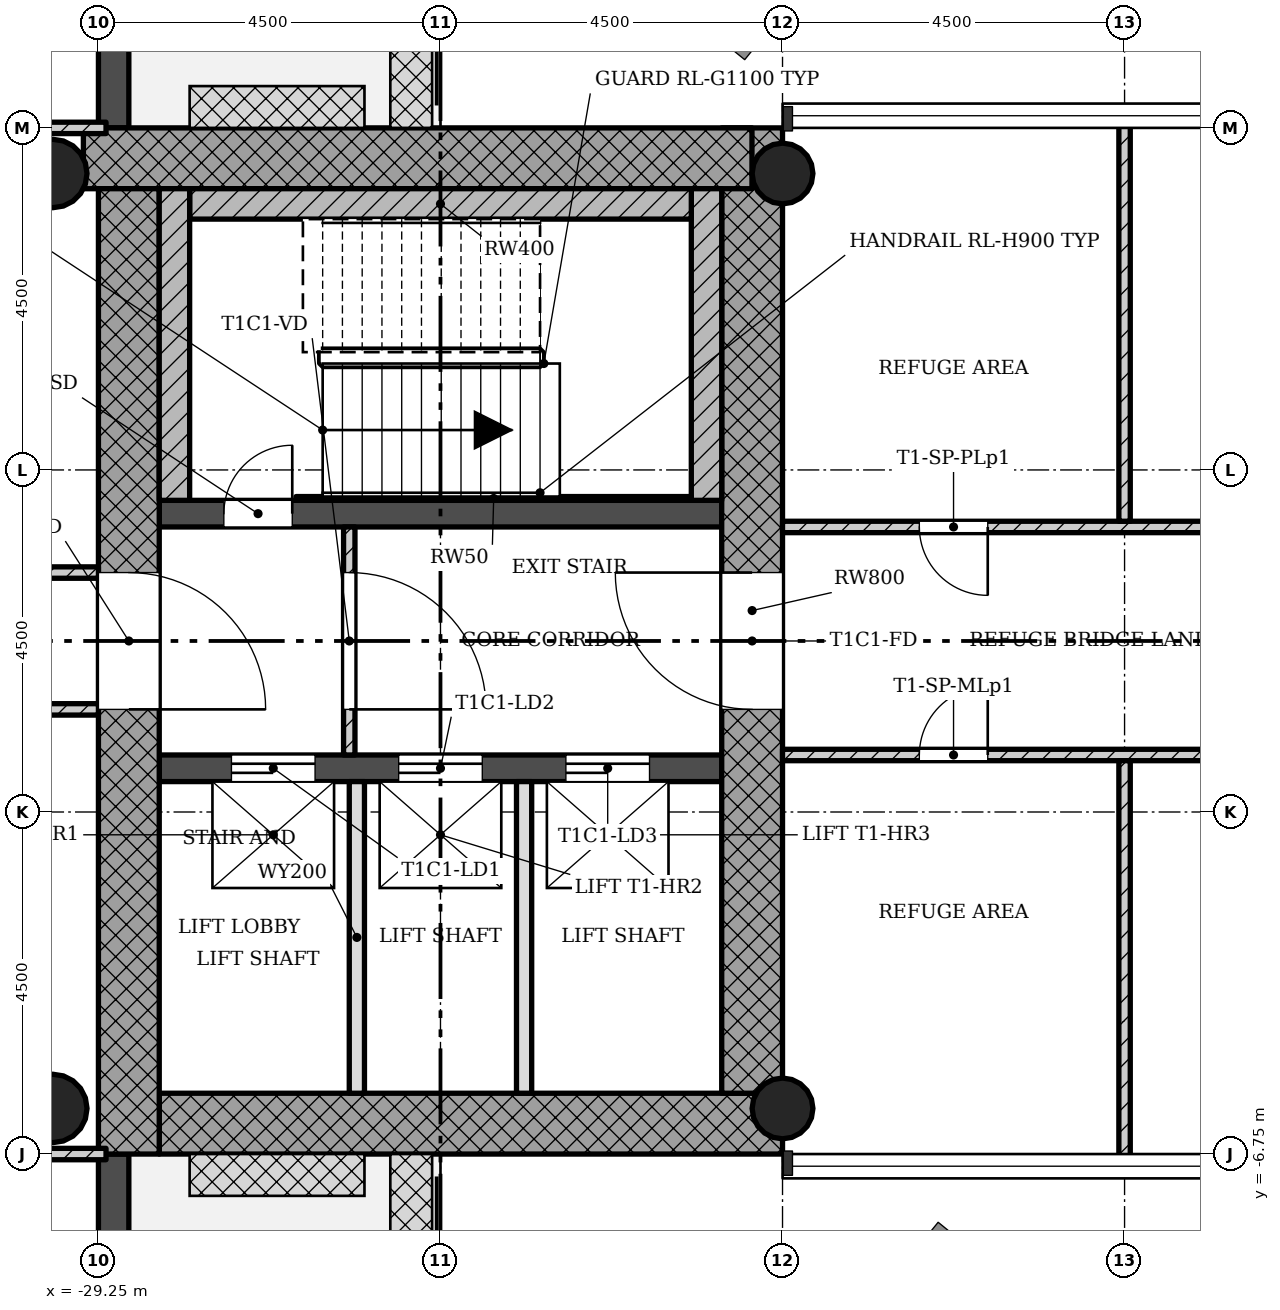
"""IFC4 building model, lengths in metres.
Left out: names, types, materials, properties, quantities, classifications, styles, units other than length and angle.
Written with IfcOpenShell. Run it as: python <this file> out.ifc"""

import sys

from ifc_helpers import new_model, si_unit, direction, frame, frame_2d, origin, origin_2d, place, context, subcontext, project, spatial, rectangle, hollow_circle, extrude, element, fill, save


model = new_model("IFC4")
c1 = context("Model", 3, precision=1e-05, world=origin(), true_north=direction((0.0, 1.0)))
c2 = subcontext(c1, "Body", "Model", "MODEL_VIEW")
j1 = project(units=[si_unit("LENGTHUNIT", "METRE"), si_unit("PLANEANGLEUNIT", "RADIAN")], contexts=[c1])
p1 = place(None, origin())
s1 = spatial("IfcSite", under=j1, at=p1, CompositionType="ELEMENT")
p2 = place(p1, origin())
s2 = spatial("IfcBuilding", under=s1, at=p2, CompositionType="ELEMENT")
p3 = place(p2, frame((0.0, 0.0, 181.3)))
s3 = spatial("IfcBuildingStorey", under=s2, at=p3, CompositionType="ELEMENT", Elevation=181.3)
p4 = place(p3, frame((-28.45, -6.35, 0.0), z_axis=(0.0, 0.0, 1.0), x_axis=(1.0, 0.0, 0.0)))
e1 = element("IfcWall", 1, at=p4, inside=s3, PredefinedType="SHEAR", context=c2, shape_type="SweptSolid", body=[
    extrude(rectangle(XDim=8.2, YDim=0.8, at=frame_2d((4.1, 0.0))), origin(), (0.0, 0.0, 1.0), 4.5),
])
p5 = place(p3, frame((-20.65, -5.95, 0.0), z_axis=(0.0, 0.0, 1.0), x_axis=(0.0, 1.0, 0.0)))
e2 = element("IfcWall", 2, at=p5, inside=s3, PredefinedType="SHEAR", context=c2, shape_type="SweptSolid", body=[
    extrude(rectangle(XDim=12.7, YDim=0.8, at=frame_2d((6.35, 0.0))), origin(), (0.0, 0.0, 1.0), 4.5),
])
p6 = place(p5, frame((5.05, 0.0, 0.0)))
e3 = element("IfcOpeningElement", 3, at=p6, cuts=e2, PredefinedType="OPENING", context=c2, shape_type="SweptSolid", body=[
    extrude(rectangle(XDim=1.8, YDim=2.1, at=frame_2d((0.9, 1.05))), frame((0.0, 0.41, 0.0), z_axis=(0.0, -1.0, 0.0), x_axis=(1.0, 0.0, 0.0)), (0.0, 0.0, 1.0), 0.82),
])
p7 = place(p3, frame((-20.652, 6.35, 0.0), z_axis=(0.0, 0.0, 1.0), x_axis=(-1.0, 0.0, 0.0)))
e4 = element("IfcWall", 4, at=p7, inside=s3, PredefinedType="SHEAR", context=c2, shape_type="SweptSolid", body=[
    extrude(rectangle(XDim=8.796, YDim=0.8, at=frame_2d((4.398, 0.0))), origin(), (0.0, 0.0, 1.0), 4.5),
])
p8 = place(p3, frame((-28.85, 5.95, 0.0), z_axis=(0.0, 0.0, 1.0), x_axis=(0.0, -1.0, 0.0)))
e5 = element("IfcWall", 5, at=p8, inside=s3, PredefinedType="SHEAR", context=c2, shape_type="SweptSolid", body=[
    extrude(rectangle(XDim=12.7, YDim=0.8, at=frame_2d((6.35, 0.0))), origin(), (0.0, 0.0, 1.0), 4.5),
])
p9 = place(p8, frame((5.05, 0.0, 0.0)))
e6 = element("IfcOpeningElement", 6, at=p9, cuts=e5, PredefinedType="OPENING", context=c2, shape_type="SweptSolid", body=[
    extrude(rectangle(XDim=1.8, YDim=2.1, at=frame_2d((0.9, 1.05))), frame((0.0, 0.41, 0.0), z_axis=(0.0, -1.0, 0.0), x_axis=(1.0, 0.0, 0.0)), (0.0, 0.0, 1.0), 0.82),
])
p10 = place(p3, frame((-28.45, -1.675, 0.0), z_axis=(0.0, 0.0, 1.0), x_axis=(1.0, 0.0, 0.0)))
e7 = element("IfcWall", 7, at=p10, inside=s3, PredefinedType="SHEAR", context=c2, shape_type="SweptSolid", body=[
    extrude(rectangle(XDim=7.4, YDim=0.35, at=frame_2d((3.7, 0.0))), origin(), (0.0, 0.0, 1.0), 4.5),
])
p11 = place(p10, frame((0.95, 0.0, 0.0)))
e8 = element("IfcOpeningElement", 8, at=p11, cuts=e7, PredefinedType="OPENING", context=c2, shape_type="SweptSolid", body=[
    extrude(rectangle(XDim=1.1, YDim=2.1, at=frame_2d((0.55, 1.05))), frame((0.0, 0.185, 0.0), z_axis=(0.0, -1.0, 0.0), x_axis=(1.0, 0.0, 0.0)), (0.0, 0.0, 1.0), 0.37),
])
p12 = place(p10, frame((3.15, 0.0, 0.0)))
e9 = element("IfcOpeningElement", 9, at=p12, cuts=e7, PredefinedType="OPENING", context=c2, shape_type="SweptSolid", body=[
    extrude(rectangle(XDim=1.1, YDim=2.1, at=frame_2d((0.55, 1.05))), frame((0.0, 0.185, 0.0), z_axis=(0.0, -1.0, 0.0), x_axis=(1.0, 0.0, 0.0)), (0.0, 0.0, 1.0), 0.37),
])
p13 = place(p10, frame((5.35, 0.0, 0.0)))
e10 = element("IfcOpeningElement", 10, at=p13, cuts=e7, PredefinedType="OPENING", context=c2, shape_type="SweptSolid", body=[
    extrude(rectangle(XDim=1.1, YDim=2.1, at=frame_2d((0.55, 1.05))), frame((0.0, 0.185, 0.0), z_axis=(0.0, -1.0, 0.0), x_axis=(1.0, 0.0, 0.0)), (0.0, 0.0, 1.0), 0.37),
])
p14 = place(p3, frame((-28.45, 1.675, 0.0), z_axis=(0.0, 0.0, 1.0), x_axis=(1.0, 0.0, 0.0)))
e11 = element("IfcWall", 11, at=p14, inside=s3, PredefinedType="SHEAR", context=c2, shape_type="SweptSolid", body=[
    extrude(rectangle(XDim=7.4, YDim=0.35, at=frame_2d((3.7, 0.0))), origin(), (0.0, 0.0, 1.0), 4.5),
])
p15 = place(p14, frame((0.85, 0.0, 0.0)))
e12 = element("IfcOpeningElement", 12, at=p15, cuts=e11, PredefinedType="OPENING", context=c2, shape_type="SweptSolid", body=[
    extrude(rectangle(XDim=0.9, YDim=2.1, at=frame_2d((0.45, 1.05))), frame((0.0, 0.185, 0.0), z_axis=(0.0, -1.0, 0.0), x_axis=(1.0, 0.0, 0.0)), (0.0, 0.0, 1.0), 0.37),
])
for number, where, z_axis, x_axis in (
    (13, (-20.25, -6.15, 0.0), (0.0, 0.0, 1.0), (1.0, 0.0, 0.0)),
    (14, (-20.25, 6.15, 0.0), (0.0, 0.0, 1.0), (1.0, 0.0, 0.0)),
):
    element("IfcColumn", number, at=place(p3, frame(where, z_axis=z_axis, x_axis=x_axis)), inside=s3, PredefinedType="COLUMN", context=c2, shape_type="SweptSolid", body=[
        extrude(hollow_circle(Radius=0.4, WallThickness=0.028, at=origin_2d()), origin(), (0.0, 0.0, 1.0), 4.5),
    ])
for number, where, z_axis, x_axis in (
    (15, (-29.85, -6.15, 0.0), (0.0, 0.0, 1.0), (1.0, 0.0, 0.0)),
    (16, (-29.85, 6.15, 0.0), (0.0, 0.0, 1.0), (1.0, 0.0, 0.0)),
):
    element("IfcColumn", number, at=place(p3, frame(where, z_axis=z_axis, x_axis=x_axis)), inside=s3, PredefinedType="COLUMN", context=c2, shape_type="SweptSolid", body=[
        extrude(hollow_circle(Radius=0.45, WallThickness=0.032, at=origin_2d()), origin(), (0.0, 0.0, 1.0), 4.5),
    ])
p16 = place(p3, frame((-29.05, -11.25, -0.02), z_axis=(0.0, 0.0, 1.0), x_axis=(0.0, 1.0, 0.0)))
e17 = element("IfcWall", 17, at=p16, inside=s3, PredefinedType="STANDARD", context=c2, shape_type="SweptSolid", body=[
    extrude(rectangle(XDim=4.5, YDim=0.4, at=frame_2d((2.25, 0.0))), origin(), (0.0, 0.0, 1.0), 4.22),
])
p17 = place(p16, frame((1.35, 0.0, 0.02)))
e18 = element("IfcOpeningElement", 18, at=p17, cuts=e17, PredefinedType="OPENING", context=c2, shape_type="SweptSolid", body=[
    extrude(rectangle(XDim=1.8, YDim=2.1, at=frame_2d((0.9, 1.05))), frame((0.0, 0.21, 0.0), z_axis=(0.0, -1.0, 0.0), x_axis=(1.0, 0.0, 0.0)), (0.0, 0.0, 1.0), 0.42),
])
p18 = place(p3, frame((-29.05, 6.75, -0.02), z_axis=(0.0, 0.0, 1.0), x_axis=(0.0, 1.0, 0.0)))
e19 = element("IfcWall", 19, at=p18, inside=s3, PredefinedType="STANDARD", context=c2, shape_type="SweptSolid", body=[
    extrude(rectangle(XDim=4.5, YDim=0.4, at=frame_2d((2.25, 0.0))), origin(), (0.0, 0.0, 1.0), 4.22),
])
p19 = place(p18, frame((1.35, 0.0, 0.02)))
e20 = element("IfcOpeningElement", 20, at=p19, cuts=e19, PredefinedType="OPENING", context=c2, shape_type="SweptSolid", body=[
    extrude(rectangle(XDim=1.8, YDim=2.1, at=frame_2d((0.9, 1.05))), frame((0.0, 0.21, 0.0), z_axis=(0.0, -1.0, 0.0), x_axis=(1.0, 0.0, 0.0)), (0.0, 0.0, 1.0), 0.42),
])
p20 = place(p3, frame((-25.95, -1.5, 0.0), z_axis=(0.0, 0.0, 1.0), x_axis=(0.0, 1.0, 0.0)))
e21 = element("IfcWall", 21, at=p20, inside=s3, PredefinedType="PARTITIONING", context=c2, shape_type="SweptSolid", body=[
    extrude(rectangle(XDim=3.0, YDim=0.15, at=frame_2d((1.5, 0.0))), origin(), (0.0, 0.0, 1.0), 4.08),
])
p21 = place(p20, frame((0.6, 0.0, 0.0)))
e22 = element("IfcOpeningElement", 22, at=p21, cuts=e21, PredefinedType="OPENING", context=c2, shape_type="SweptSolid", body=[
    extrude(rectangle(XDim=1.8, YDim=2.1, at=frame_2d((0.9, 1.05))), frame((0.0, 0.085, 0.0), z_axis=(0.0, -1.0, 0.0), x_axis=(1.0, 0.0, 0.0)), (0.0, 0.0, 1.0), 0.17),
])
for number, where, z_axis, x_axis in (
    (23, (-25.85, -5.95, 0.0), (0.0, 0.0, 1.0), (0.0, 1.0, 0.0)),
    (24, (-23.65, -5.95, 0.0), (0.0, 0.0, 1.0), (0.0, 1.0, 0.0)),
):
    element("IfcWall", number, at=place(p3, frame(where, z_axis=z_axis, x_axis=x_axis)), inside=s3, PredefinedType="SOLIDWALL", context=c2, shape_type="SweptSolid", body=[
        extrude(rectangle(XDim=4.1, YDim=0.2, at=frame_2d((2.05, 0.0))), origin(), (0.0, 0.0, 1.0), 4.08),
    ])
p22 = place(p3, frame((-35.1, 0.9, 0.0), z_axis=(0.0, 0.0, 1.0), x_axis=(1.0, 0.0, 0.0)))
e25 = element("IfcWall", 25, at=p22, inside=s3, PredefinedType="PARTITIONING", context=c2, shape_type="SweptSolid", body=[
    extrude(rectangle(XDim=5.85, YDim=0.15, at=frame_2d((2.925, 0.0))), origin(), (0.0, 0.0, 1.0), 4.08),
])
p23 = place(p22, frame((2.475, 0.0, 0.0)))
e26 = element("IfcOpeningElement", 26, at=p23, cuts=e25, PredefinedType="OPENING", context=c2, shape_type="SweptSolid", body=[
    extrude(rectangle(XDim=0.9, YDim=2.1, at=frame_2d((0.45, 1.05))), frame((0.0, 0.085, 0.0), z_axis=(0.0, -1.0, 0.0), x_axis=(1.0, 0.0, 0.0)), (0.0, 0.0, 1.0), 0.17),
])
p24 = place(p3, frame((-35.1, -0.9, 0.0), z_axis=(0.0, 0.0, 1.0), x_axis=(1.0, 0.0, 0.0)))
e27 = element("IfcWall", 27, at=p24, inside=s3, PredefinedType="PARTITIONING", context=c2, shape_type="SweptSolid", body=[
    extrude(rectangle(XDim=5.85, YDim=0.15, at=frame_2d((2.925, 0.0))), origin(), (0.0, 0.0, 1.0), 4.08),
])
p25 = place(p24, frame((2.475, 0.0, 0.0)))
e28 = element("IfcOpeningElement", 28, at=p25, cuts=e27, PredefinedType="OPENING", context=c2, shape_type="SweptSolid", body=[
    extrude(rectangle(XDim=0.9, YDim=2.1, at=frame_2d((0.45, 1.05))), frame((0.0, 0.085, 0.0), z_axis=(0.0, -1.0, 0.0), x_axis=(1.0, 0.0, 0.0)), (0.0, 0.0, 1.0), 0.17),
])
p26 = place(p3, frame((-20.25, 1.5, 0.0), z_axis=(0.0, 0.0, 1.0), x_axis=(1.0, 0.0, 0.0)))
e29 = element("IfcWall", 29, at=p26, inside=s3, PredefinedType="PARTITIONING", context=c2, shape_type="SweptSolid", body=[
    extrude(rectangle(XDim=9.1, YDim=0.15, at=frame_2d((4.55, 0.0))), origin(), (0.0, 0.0, 1.0), 4.08),
])
p27 = place(p26, frame((1.8, 0.0, 0.0)))
e30 = element("IfcOpeningElement", 30, at=p27, cuts=e29, PredefinedType="OPENING", context=c2, shape_type="SweptSolid", body=[
    extrude(rectangle(XDim=0.9, YDim=2.1, at=frame_2d((0.45, 1.05))), frame((0.0, 0.085, 0.0), z_axis=(0.0, -1.0, 0.0), x_axis=(1.0, 0.0, 0.0)), (0.0, 0.0, 1.0), 0.17),
])
p28 = place(p26, frame((6.3, 0.0, 0.0)))
e31 = element("IfcOpeningElement", 31, at=p28, cuts=e29, PredefinedType="OPENING", context=c2, shape_type="SweptSolid", body=[
    extrude(rectangle(XDim=0.9, YDim=2.1, at=frame_2d((0.45, 1.05))), frame((0.0, 0.085, 0.0), z_axis=(0.0, -1.0, 0.0), x_axis=(1.0, 0.0, 0.0)), (0.0, 0.0, 1.0), 0.17),
])
p29 = place(p3, frame((-15.75, 1.575, 0.0), z_axis=(0.0, 0.0, 1.0), x_axis=(0.0, 1.0, 0.0)))
e32 = element("IfcWall", 32, at=p29, inside=s3, PredefinedType="PARTITIONING", context=c2, shape_type="SweptSolid", body=[
    extrude(rectangle(XDim=5.275, YDim=0.15, at=frame_2d((2.638, 0.0))), origin(), (0.0, 0.0, 1.0), 4.08),
])
p30 = place(p3, frame((-20.25, -1.5, 0.0), z_axis=(0.0, 0.0, 1.0), x_axis=(1.0, 0.0, 0.0)))
e33 = element("IfcWall", 33, at=p30, inside=s3, PredefinedType="PARTITIONING", context=c2, shape_type="SweptSolid", body=[
    extrude(rectangle(XDim=9.1, YDim=0.15, at=frame_2d((4.55, 0.0))), origin(), (0.0, 0.0, 1.0), 4.08),
])
p31 = place(p30, frame((1.8, 0.0, 0.0)))
e34 = element("IfcOpeningElement", 34, at=p31, cuts=e33, PredefinedType="OPENING", context=c2, shape_type="SweptSolid", body=[
    extrude(rectangle(XDim=0.9, YDim=2.1, at=frame_2d((0.45, 1.05))), frame((0.0, 0.085, 0.0), z_axis=(0.0, -1.0, 0.0), x_axis=(1.0, 0.0, 0.0)), (0.0, 0.0, 1.0), 0.17),
])
p32 = place(p30, frame((6.3, 0.0, 0.0)))
e35 = element("IfcOpeningElement", 35, at=p32, cuts=e33, PredefinedType="OPENING", context=c2, shape_type="SweptSolid", body=[
    extrude(rectangle(XDim=0.9, YDim=2.1, at=frame_2d((0.45, 1.05))), frame((0.0, 0.085, 0.0), z_axis=(0.0, -1.0, 0.0), x_axis=(1.0, 0.0, 0.0)), (0.0, 0.0, 1.0), 0.17),
])
p33 = place(p3, frame((-15.75, -1.575, 0.0), z_axis=(0.0, 0.0, 1.0), x_axis=(0.0, -1.0, 0.0)))
e36 = element("IfcWall", 36, at=p33, inside=s3, PredefinedType="PARTITIONING", context=c2, shape_type="SweptSolid", body=[
    extrude(rectangle(XDim=5.275, YDim=0.15, at=frame_2d((2.638, 0.0))), origin(), (0.0, 0.0, 1.0), 4.08),
])
p34 = place(p3, frame((-42.85, 6.75, 0.0), z_axis=(0.0, 0.0, 1.0), x_axis=(1.0, 0.0, 0.0)))
e37 = element("IfcWall", 37, at=p34, inside=s3, PredefinedType="PARTITIONING", context=c2, shape_type="SweptSolid", body=[
    extrude(rectangle(XDim=13.7, YDim=0.15, at=frame_2d((6.85, 0.0))), origin(), (0.0, 0.0, 1.0), 4.08),
])
p35 = place(p34, frame((5.95, 0.0, 0.0)))
e38 = element("IfcOpeningElement", 38, at=p35, cuts=e37, PredefinedType="OPENING", context=c2, shape_type="SweptSolid", body=[
    extrude(rectangle(XDim=1.8, YDim=2.1, at=frame_2d((0.9, 1.05))), frame((0.0, 0.085, 0.0), z_axis=(0.0, -1.0, 0.0), x_axis=(1.0, 0.0, 0.0)), (0.0, 0.0, 1.0), 0.17),
])
p36 = place(p3, frame((-42.85, -6.75, 0.0), z_axis=(0.0, 0.0, 1.0), x_axis=(1.0, 0.0, 0.0)))
e39 = element("IfcWall", 39, at=p36, inside=s3, PredefinedType="PARTITIONING", context=c2, shape_type="SweptSolid", body=[
    extrude(rectangle(XDim=13.7, YDim=0.15, at=frame_2d((6.85, 0.0))), origin(), (0.0, 0.0, 1.0), 4.08),
])
p37 = place(p36, frame((5.95, 0.0, 0.0)))
e40 = element("IfcOpeningElement", 40, at=p37, cuts=e39, PredefinedType="OPENING", context=c2, shape_type="SweptSolid", body=[
    extrude(rectangle(XDim=1.8, YDim=2.1, at=frame_2d((0.9, 1.05))), frame((0.0, 0.085, 0.0), z_axis=(0.0, -1.0, 0.0), x_axis=(1.0, 0.0, 0.0)), (0.0, 0.0, 1.0), 0.17),
])
p38 = place(p3, frame((-21.25, 1.85, 0.0), z_axis=(0.0, 0.0, 1.0), x_axis=(0.0, 1.0, 0.0)))
e41 = element("IfcWall", 41, at=p38, inside=s3, PredefinedType="SHEAR", context=c2, shape_type="SweptSolid", body=[
    extrude(rectangle(XDim=4.1, YDim=0.4, at=frame_2d((2.05, 0.0))), origin(), (0.0, 0.0, 1.0), 4.5),
])
p39 = place(p3, frame((-28.05, 5.75, 0.0), z_axis=(0.0, 0.0, 1.0), x_axis=(1.0, 0.0, 0.0)))
e42 = element("IfcWall", 42, at=p39, inside=s3, PredefinedType="SHEAR", context=c2, shape_type="SweptSolid", body=[
    extrude(rectangle(XDim=6.6, YDim=0.4, at=frame_2d((3.3, 0.0))), origin(), (0.0, 0.0, 1.0), 4.5),
])
p40 = place(p3, frame((-28.25, 1.85, 0.0), z_axis=(0.0, 0.0, 1.0), x_axis=(0.0, 1.0, 0.0)))
e43 = element("IfcWall", 43, at=p40, inside=s3, PredefinedType="SHEAR", context=c2, shape_type="SweptSolid", body=[
    extrude(rectangle(XDim=4.1, YDim=0.4, at=frame_2d((2.05, 0.0))), origin(), (0.0, 0.0, 1.0), 4.5),
])
p41 = place(p3, frame((-26.65, 1.875, 0.0), z_axis=(0.0, 0.0, 1.0), x_axis=(1.0, 0.0, 0.0)))
e44 = element("IfcWall", 44, at=p41, inside=s3, PredefinedType="SHEAR", context=c2, shape_type="SweptSolid", body=[
    extrude(rectangle(XDim=5.2, YDim=0.05, at=frame_2d((2.6, 0.0))), origin(), (0.0, 0.0, 1.0), 4.5),
])
p42 = place(p21, origin())
e45 = element("IfcDoor", 45, at=p42, inside=s3, OperationType="SINGLE_SWING_LEFT", PredefinedType="DOOR", context=c2, shape_type="SweptSolid", body=[
    extrude(rectangle(XDim=1.8, YDim=2.1, at=frame_2d((0.9, 1.05))), frame((0.0, 0.025, 0.0), z_axis=(0.0, -1.0, 0.0), x_axis=(1.0, 0.0, 0.0)), (0.0, 0.0, 1.0), 0.05),
])
fill(e22, e45)
p43 = place(p27, origin())
e46 = element("IfcDoor", 46, at=p43, inside=s3, OperationType="SINGLE_SWING_RIGHT", PredefinedType="DOOR", context=c2, shape_type="SweptSolid", body=[
    extrude(rectangle(XDim=0.9, YDim=2.1, at=frame_2d((0.45, 1.05))), frame((0.0, 0.025, 0.0), z_axis=(0.0, -1.0, 0.0), x_axis=(1.0, 0.0, 0.0)), (0.0, 0.0, 1.0), 0.05),
])
fill(e30, e46)
p44 = place(p31, origin())
e47 = element("IfcDoor", 47, at=p44, inside=s3, OperationType="SINGLE_SWING_LEFT", PredefinedType="DOOR", context=c2, shape_type="SweptSolid", body=[
    extrude(rectangle(XDim=0.9, YDim=2.1, at=frame_2d((0.45, 1.05))), frame((0.0, 0.025, 0.0), z_axis=(0.0, -1.0, 0.0), x_axis=(1.0, 0.0, 0.0)), (0.0, 0.0, 1.0), 0.05),
])
fill(e34, e47)
p45 = place(p15, origin())
e48 = element("IfcDoor", 48, at=p45, inside=s3, OperationType="SINGLE_SWING_LEFT", PredefinedType="DOOR", context=c2, shape_type="SweptSolid", body=[
    extrude(rectangle(XDim=0.9, YDim=2.1, at=frame_2d((0.45, 1.05))), frame((0.0, 0.025, 0.0), z_axis=(0.0, -1.0, 0.0), x_axis=(1.0, 0.0, 0.0)), (0.0, 0.0, 1.0), 0.05),
])
fill(e12, e48)
p46 = place(p11, origin())
e49 = element("IfcDoor", 49, at=p46, inside=s3, OperationType="SLIDING_TO_LEFT", PredefinedType="DOOR", context=c2, shape_type="SweptSolid", body=[
    extrude(rectangle(XDim=1.1, YDim=2.1, at=frame_2d((0.55, 1.05))), frame((0.0, 0.025, 0.0), z_axis=(0.0, -1.0, 0.0), x_axis=(1.0, 0.0, 0.0)), (0.0, 0.0, 1.0), 0.05),
])
fill(e8, e49)
p47 = place(p12, origin())
e50 = element("IfcDoor", 50, at=p47, inside=s3, OperationType="SLIDING_TO_LEFT", PredefinedType="DOOR", context=c2, shape_type="SweptSolid", body=[
    extrude(rectangle(XDim=1.1, YDim=2.1, at=frame_2d((0.55, 1.05))), frame((0.0, 0.025, 0.0), z_axis=(0.0, -1.0, 0.0), x_axis=(1.0, 0.0, 0.0)), (0.0, 0.0, 1.0), 0.05),
])
fill(e9, e50)
p48 = place(p13, origin())
e51 = element("IfcDoor", 51, at=p48, inside=s3, OperationType="SLIDING_TO_LEFT", PredefinedType="DOOR", context=c2, shape_type="SweptSolid", body=[
    extrude(rectangle(XDim=1.1, YDim=2.1, at=frame_2d((0.55, 1.05))), frame((0.0, 0.025, 0.0), z_axis=(0.0, -1.0, 0.0), x_axis=(1.0, 0.0, 0.0)), (0.0, 0.0, 1.0), 0.05),
])
fill(e10, e51)
p49 = place(p9, origin())
e52 = element("IfcDoor", 52, at=p49, inside=s3, OperationType="SINGLE_SWING_LEFT", PredefinedType="DOOR", context=c2, shape_type="SweptSolid", body=[
    extrude(rectangle(XDim=1.8, YDim=2.1, at=frame_2d((0.9, 1.05))), frame((0.0, 0.025, 0.0), z_axis=(0.0, -1.0, 0.0), x_axis=(1.0, 0.0, 0.0)), (0.0, 0.0, 1.0), 0.05),
])
fill(e6, e52)
p50 = place(p6, origin())
e53 = element("IfcDoor", 53, at=p50, inside=s3, OperationType="SINGLE_SWING_LEFT", PredefinedType="DOOR", context=c2, shape_type="SweptSolid", body=[
    extrude(rectangle(XDim=1.8, YDim=2.1, at=frame_2d((0.9, 1.05))), frame((0.0, 0.025, 0.0), z_axis=(0.0, -1.0, 0.0), x_axis=(1.0, 0.0, 0.0)), (0.0, 0.0, 1.0), 0.05),
])
fill(e3, e53)
save(model, sys.argv[1])
